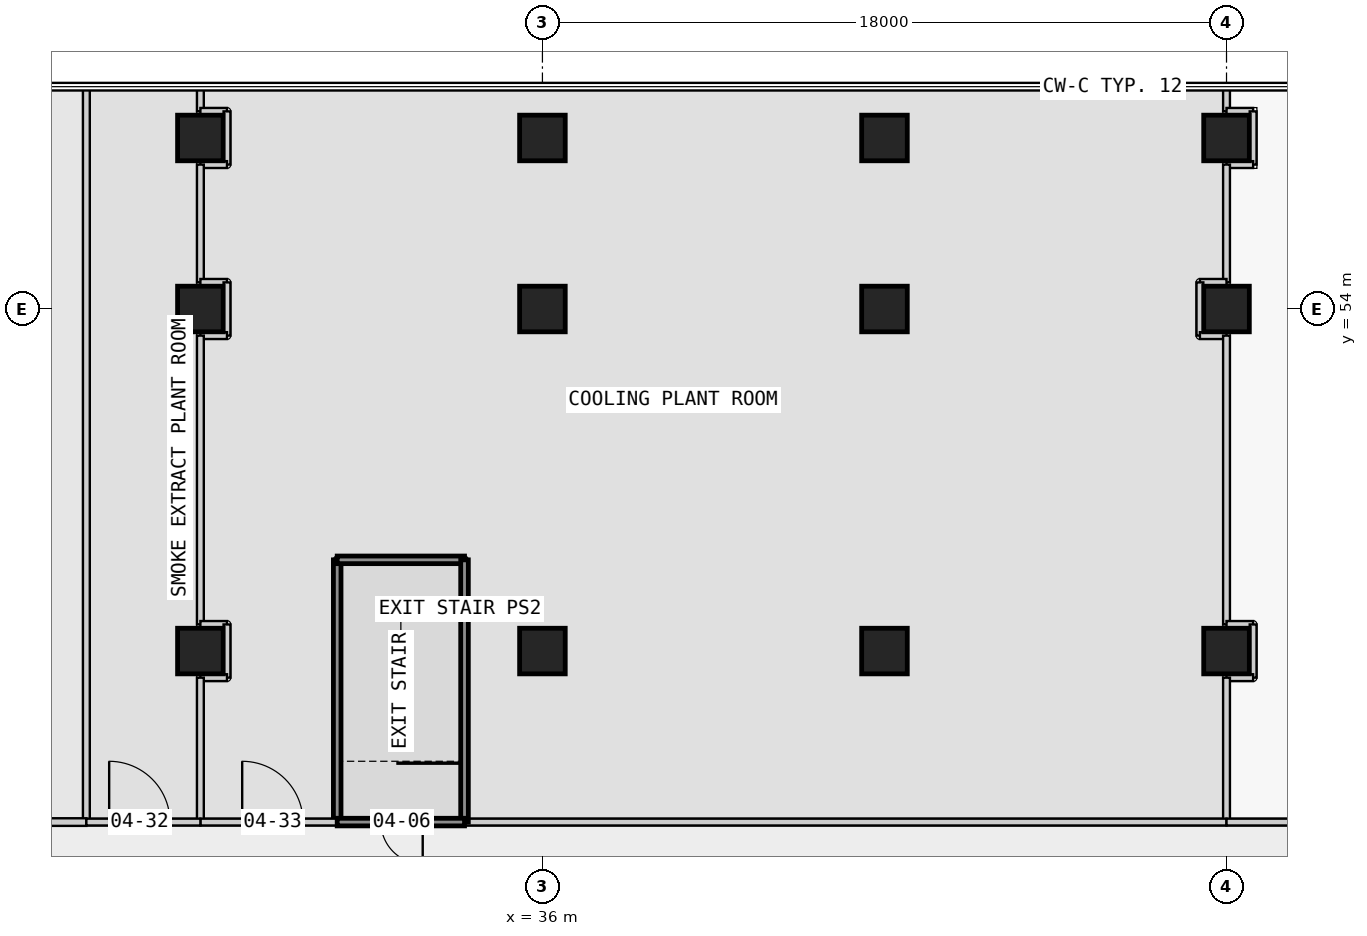
"""IFC4 building model, lengths in metres.
Left out: names, types, materials, properties, quantities, classifications, styles, units other than length and angle.
Written with IfcOpenShell. Run it as: python <this file> out.ifc"""

import sys

from ifc_helpers import new_model, si_unit, direction, frame, frame_2d, origin, origin_2d, place, context, subcontext, project, spatial, rectangle, extrude, element, fill, save


model = new_model("IFC4")
c1 = context("Model", 3, precision=1e-05, world=origin(), true_north=direction((0.0, 1.0)))
c2 = subcontext(c1, "Body", "Model", "MODEL_VIEW")
j1 = project(units=[si_unit("LENGTHUNIT", "METRE"), si_unit("PLANEANGLEUNIT", "RADIAN")], contexts=[c1])
p1 = place(None, origin())
s1 = spatial("IfcSite", under=j1, at=p1, CompositionType="ELEMENT")
p2 = place(p1, origin())
s2 = spatial("IfcBuilding", under=s1, at=p2, CompositionType="ELEMENT")
p3 = place(p2, frame((0.0, 0.0, 21.8)))
s3 = spatial("IfcBuildingStorey", under=s2, at=p3, CompositionType="ELEMENT", Elevation=21.8)
for number, where, z_axis, x_axis in (
    (1, (27.0, 45.0, 0.0), (0.0, 0.0, 1.0), (1.0, 0.0, 0.0)),
    (2, (27.0, 54.0, 0.0), (0.0, 0.0, 1.0), (1.0, 0.0, 0.0)),
    (3, (27.0, 58.5, 0.0), (0.0, 0.0, 1.0), (1.0, 0.0, 0.0)),
    (4, (36.0, 45.0, 0.0), (0.0, 0.0, 1.0), (1.0, 0.0, 0.0)),
    (5, (36.0, 54.0, 0.0), (0.0, 0.0, 1.0), (1.0, 0.0, 0.0)),
    (6, (36.0, 58.5, 0.0), (0.0, 0.0, 1.0), (1.0, 0.0, 0.0)),
    (7, (45.0, 45.0, 0.0), (0.0, 0.0, 1.0), (1.0, 0.0, 0.0)),
    (8, (45.0, 54.0, 0.0), (0.0, 0.0, 1.0), (1.0, 0.0, 0.0)),
    (9, (45.0, 58.5, 0.0), (0.0, 0.0, 1.0), (1.0, 0.0, 0.0)),
    (10, (54.0, 45.0, 0.0), (0.0, 0.0, 1.0), (1.0, 0.0, 0.0)),
    (11, (54.0, 54.0, 0.0), (0.0, 0.0, 1.0), (1.0, 0.0, 0.0)),
    (12, (54.0, 58.5, 0.0), (0.0, 0.0, 1.0), (1.0, 0.0, 0.0)),
):
    element("IfcColumn", number, at=place(p3, frame(where, z_axis=z_axis, x_axis=x_axis)), inside=s3, PredefinedType="COLUMN", context=c2, shape_type="SweptSolid", body=[
        extrude(rectangle(XDim=1.2, YDim=1.2, at=origin_2d()), origin(), (0.0, 0.0, 1.0), 5.0),
    ])
p4 = place(p3, frame((54.0, 59.85, 0.0), z_axis=(0.0, 0.0, 1.0), x_axis=(0.0, -1.0, 0.0)))
e13 = element("IfcWall", 13, at=p4, inside=s3, PredefinedType="PARTITIONING", context=c2, shape_type="SweptSolid", body=[
    extrude(rectangle(XDim=0.65, YDim=0.18, at=frame_2d((0.325, 0.0))), origin(), (0.0, 0.0, 1.0), 4.5),
])
p5 = place(p3, frame((54.0, 59.2, 0.0), z_axis=(0.0, 0.0, 1.0), x_axis=(1.0, 0.0, 0.0)))
e14 = element("IfcWall", 14, at=p5, inside=s3, PredefinedType="PARTITIONING", context=c2, shape_type="SweptSolid", body=[
    extrude(rectangle(XDim=0.7, YDim=0.18, at=frame_2d((0.35, 0.0))), origin(), (0.0, 0.0, 1.0), 4.5),
])
p6 = place(p3, frame((54.7, 59.2, 0.0), z_axis=(0.0, 0.0, 1.0), x_axis=(0.0, -1.0, 0.0)))
e15 = element("IfcWall", 15, at=p6, inside=s3, PredefinedType="PARTITIONING", context=c2, shape_type="SweptSolid", body=[
    extrude(rectangle(XDim=1.4, YDim=0.18, at=frame_2d((0.7, 0.0))), origin(), (0.0, 0.0, 1.0), 4.5),
])
p7 = place(p3, frame((54.7, 57.8, 0.0), z_axis=(0.0, 0.0, 1.0), x_axis=(-1.0, 0.0, 0.0)))
e16 = element("IfcWall", 16, at=p7, inside=s3, PredefinedType="PARTITIONING", context=c2, shape_type="SweptSolid", body=[
    extrude(rectangle(XDim=0.7, YDim=0.18, at=frame_2d((0.35, 0.0))), origin(), (0.0, 0.0, 1.0), 4.5),
])
p8 = place(p3, frame((54.0, 57.8, 0.0), z_axis=(0.0, 0.0, 1.0), x_axis=(0.0, -1.0, 0.0)))
e17 = element("IfcWall", 17, at=p8, inside=s3, PredefinedType="PARTITIONING", context=c2, shape_type="SweptSolid", body=[
    extrude(rectangle(XDim=3.1, YDim=0.18, at=frame_2d((1.55, 0.0))), origin(), (0.0, 0.0, 1.0), 4.5),
])
p9 = place(p3, frame((54.0, 54.7, 0.0), z_axis=(0.0, 0.0, 1.0), x_axis=(-1.0, 0.0, 0.0)))
e18 = element("IfcWall", 18, at=p9, inside=s3, PredefinedType="PARTITIONING", context=c2, shape_type="SweptSolid", body=[
    extrude(rectangle(XDim=0.7, YDim=0.18, at=frame_2d((0.35, 0.0))), origin(), (0.0, 0.0, 1.0), 4.5),
])
p10 = place(p3, frame((53.3, 54.7, 0.0), z_axis=(0.0, 0.0, 1.0), x_axis=(0.0, -1.0, 0.0)))
e19 = element("IfcWall", 19, at=p10, inside=s3, PredefinedType="PARTITIONING", context=c2, shape_type="SweptSolid", body=[
    extrude(rectangle(XDim=1.4, YDim=0.18, at=frame_2d((0.7, 0.0))), origin(), (0.0, 0.0, 1.0), 4.5),
])
p11 = place(p3, frame((53.3, 53.3, 0.0), z_axis=(0.0, 0.0, 1.0), x_axis=(1.0, 0.0, 0.0)))
e20 = element("IfcWall", 20, at=p11, inside=s3, PredefinedType="PARTITIONING", context=c2, shape_type="SweptSolid", body=[
    extrude(rectangle(XDim=0.7, YDim=0.18, at=frame_2d((0.35, 0.0))), origin(), (0.0, 0.0, 1.0), 4.5),
])
p12 = place(p3, frame((54.0, 53.3, 0.0), z_axis=(0.0, 0.0, 1.0), x_axis=(0.0, -1.0, 0.0)))
e21 = element("IfcWall", 21, at=p12, inside=s3, PredefinedType="PARTITIONING", context=c2, shape_type="SweptSolid", body=[
    extrude(rectangle(XDim=7.6, YDim=0.18, at=frame_2d((3.8, 0.0))), origin(), (0.0, 0.0, 1.0), 4.5),
])
p13 = place(p3, frame((54.0, 45.7, 0.0), z_axis=(0.0, 0.0, 1.0), x_axis=(1.0, 0.0, 0.0)))
e22 = element("IfcWall", 22, at=p13, inside=s3, PredefinedType="PARTITIONING", context=c2, shape_type="SweptSolid", body=[
    extrude(rectangle(XDim=0.7, YDim=0.18, at=frame_2d((0.35, 0.0))), origin(), (0.0, 0.0, 1.0), 4.5),
])
p14 = place(p3, frame((54.7, 45.7, 0.0), z_axis=(0.0, 0.0, 1.0), x_axis=(0.0, -1.0, 0.0)))
e23 = element("IfcWall", 23, at=p14, inside=s3, PredefinedType="PARTITIONING", context=c2, shape_type="SweptSolid", body=[
    extrude(rectangle(XDim=1.4, YDim=0.18, at=frame_2d((0.7, 0.0))), origin(), (0.0, 0.0, 1.0), 4.5),
])
p15 = place(p3, frame((54.7, 44.3, 0.0), z_axis=(0.0, 0.0, 1.0), x_axis=(-1.0, 0.0, 0.0)))
e24 = element("IfcWall", 24, at=p15, inside=s3, PredefinedType="PARTITIONING", context=c2, shape_type="SweptSolid", body=[
    extrude(rectangle(XDim=0.7, YDim=0.18, at=frame_2d((0.35, 0.0))), origin(), (0.0, 0.0, 1.0), 4.5),
])
p16 = place(p3, frame((54.0, 44.3, 0.0), z_axis=(0.0, 0.0, 1.0), x_axis=(0.0, -1.0, 0.0)))
e25 = element("IfcWall", 25, at=p16, inside=s3, PredefinedType="PARTITIONING", context=c2, shape_type="SweptSolid", body=[
    extrude(rectangle(XDim=3.8, YDim=0.18, at=frame_2d((1.9, 0.0))), origin(), (0.0, 0.0, 1.0), 4.5),
])
p17 = place(p3, frame((27.0, 59.85, 0.0), z_axis=(0.0, 0.0, 1.0), x_axis=(0.0, -1.0, 0.0)))
e26 = element("IfcWall", 26, at=p17, inside=s3, PredefinedType="PARTITIONING", context=c2, shape_type="SweptSolid", body=[
    extrude(rectangle(XDim=0.65, YDim=0.18, at=frame_2d((0.325, 0.0))), origin(), (0.0, 0.0, 1.0), 4.5),
])
p18 = place(p3, frame((27.0, 59.2, 0.0), z_axis=(0.0, 0.0, 1.0), x_axis=(1.0, 0.0, 0.0)))
e27 = element("IfcWall", 27, at=p18, inside=s3, PredefinedType="PARTITIONING", context=c2, shape_type="SweptSolid", body=[
    extrude(rectangle(XDim=0.7, YDim=0.18, at=frame_2d((0.35, 0.0))), origin(), (0.0, 0.0, 1.0), 4.5),
])
p19 = place(p3, frame((27.7, 59.2, 0.0), z_axis=(0.0, 0.0, 1.0), x_axis=(0.0, -1.0, 0.0)))
e28 = element("IfcWall", 28, at=p19, inside=s3, PredefinedType="PARTITIONING", context=c2, shape_type="SweptSolid", body=[
    extrude(rectangle(XDim=1.4, YDim=0.18, at=frame_2d((0.7, 0.0))), origin(), (0.0, 0.0, 1.0), 4.5),
])
p20 = place(p3, frame((27.7, 57.8, 0.0), z_axis=(0.0, 0.0, 1.0), x_axis=(-1.0, 0.0, 0.0)))
e29 = element("IfcWall", 29, at=p20, inside=s3, PredefinedType="PARTITIONING", context=c2, shape_type="SweptSolid", body=[
    extrude(rectangle(XDim=0.7, YDim=0.18, at=frame_2d((0.35, 0.0))), origin(), (0.0, 0.0, 1.0), 4.5),
])
p21 = place(p3, frame((27.0, 57.8, 0.0), z_axis=(0.0, 0.0, 1.0), x_axis=(0.0, -1.0, 0.0)))
e30 = element("IfcWall", 30, at=p21, inside=s3, PredefinedType="PARTITIONING", context=c2, shape_type="SweptSolid", body=[
    extrude(rectangle(XDim=3.1, YDim=0.18, at=frame_2d((1.55, 0.0))), origin(), (0.0, 0.0, 1.0), 4.5),
])
p22 = place(p3, frame((27.0, 54.7, 0.0), z_axis=(0.0, 0.0, 1.0), x_axis=(1.0, 0.0, 0.0)))
e31 = element("IfcWall", 31, at=p22, inside=s3, PredefinedType="PARTITIONING", context=c2, shape_type="SweptSolid", body=[
    extrude(rectangle(XDim=0.7, YDim=0.18, at=frame_2d((0.35, 0.0))), origin(), (0.0, 0.0, 1.0), 4.5),
])
p23 = place(p3, frame((27.7, 54.7, 0.0), z_axis=(0.0, 0.0, 1.0), x_axis=(0.0, -1.0, 0.0)))
e32 = element("IfcWall", 32, at=p23, inside=s3, PredefinedType="PARTITIONING", context=c2, shape_type="SweptSolid", body=[
    extrude(rectangle(XDim=1.4, YDim=0.18, at=frame_2d((0.7, 0.0))), origin(), (0.0, 0.0, 1.0), 4.5),
])
p24 = place(p3, frame((27.7, 53.3, 0.0), z_axis=(0.0, 0.0, 1.0), x_axis=(-1.0, 0.0, 0.0)))
e33 = element("IfcWall", 33, at=p24, inside=s3, PredefinedType="PARTITIONING", context=c2, shape_type="SweptSolid", body=[
    extrude(rectangle(XDim=0.7, YDim=0.18, at=frame_2d((0.35, 0.0))), origin(), (0.0, 0.0, 1.0), 4.5),
])
p25 = place(p3, frame((27.0, 53.3, 0.0), z_axis=(0.0, 0.0, 1.0), x_axis=(0.0, -1.0, 0.0)))
e34 = element("IfcWall", 34, at=p25, inside=s3, PredefinedType="PARTITIONING", context=c2, shape_type="SweptSolid", body=[
    extrude(rectangle(XDim=7.6, YDim=0.18, at=frame_2d((3.8, 0.0))), origin(), (0.0, 0.0, 1.0), 4.5),
])
p26 = place(p3, frame((27.0, 45.7, 0.0), z_axis=(0.0, 0.0, 1.0), x_axis=(1.0, 0.0, 0.0)))
e35 = element("IfcWall", 35, at=p26, inside=s3, PredefinedType="PARTITIONING", context=c2, shape_type="SweptSolid", body=[
    extrude(rectangle(XDim=0.7, YDim=0.18, at=frame_2d((0.35, 0.0))), origin(), (0.0, 0.0, 1.0), 4.5),
])
p27 = place(p3, frame((27.7, 45.7, 0.0), z_axis=(0.0, 0.0, 1.0), x_axis=(0.0, -1.0, 0.0)))
e36 = element("IfcWall", 36, at=p27, inside=s3, PredefinedType="PARTITIONING", context=c2, shape_type="SweptSolid", body=[
    extrude(rectangle(XDim=1.4, YDim=0.18, at=frame_2d((0.7, 0.0))), origin(), (0.0, 0.0, 1.0), 4.5),
])
p28 = place(p3, frame((27.7, 44.3, 0.0), z_axis=(0.0, 0.0, 1.0), x_axis=(-1.0, 0.0, 0.0)))
e37 = element("IfcWall", 37, at=p28, inside=s3, PredefinedType="PARTITIONING", context=c2, shape_type="SweptSolid", body=[
    extrude(rectangle(XDim=0.7, YDim=0.18, at=frame_2d((0.35, 0.0))), origin(), (0.0, 0.0, 1.0), 4.5),
])
p29 = place(p3, frame((27.0, 44.3, 0.0), z_axis=(0.0, 0.0, 1.0), x_axis=(0.0, -1.0, 0.0)))
e38 = element("IfcWall", 38, at=p29, inside=s3, PredefinedType="PARTITIONING", context=c2, shape_type="SweptSolid", body=[
    extrude(rectangle(XDim=3.8, YDim=0.18, at=frame_2d((1.9, 0.0))), origin(), (0.0, 0.0, 1.0), 4.5),
])
p30 = place(p3, frame((33.95, 40.5, 0.0), z_axis=(0.0, 0.0, 1.0), x_axis=(1.0, 0.0, 0.0)))
e39 = element("IfcWall", 39, at=p30, inside=s3, PredefinedType="PARTITIONING", context=c2, shape_type="SweptSolid", body=[
    extrude(rectangle(XDim=20.05, YDim=0.18, at=frame_2d((10.025, 0.0))), origin(), (0.0, 0.0, 1.0), 4.5),
])
p31 = place(p3, frame((24.0, 59.85, 0.0), z_axis=(0.0, 0.0, 1.0), x_axis=(0.0, -1.0, 0.0)))
e40 = element("IfcWall", 40, at=p31, inside=s3, PredefinedType="PARTITIONING", context=c2, shape_type="SweptSolid", body=[
    extrude(rectangle(XDim=19.35, YDim=0.18, at=frame_2d((9.675, 0.0))), origin(), (0.0, 0.0, 1.0), 4.5),
])
p32 = place(p3, frame((30.6, 40.5, 0.0), z_axis=(0.0, 0.0, 1.0), x_axis=(0.0, 1.0, 0.0)))
e41 = element("IfcWall", 41, at=p32, inside=s3, PredefinedType="PARTITIONING", context=c2, shape_type="SweptSolid", body=[
    extrude(rectangle(XDim=6.9, YDim=0.2, at=frame_2d((3.45, 0.0))), origin(), (0.0, 0.0, 1.0), 4.5),
])
p33 = place(p3, frame((30.6, 47.4, 0.0), z_axis=(0.0, 0.0, 1.0), x_axis=(1.0, 0.0, 0.0)))
e42 = element("IfcWall", 42, at=p33, inside=s3, PredefinedType="PARTITIONING", context=c2, shape_type="SweptSolid", body=[
    extrude(rectangle(XDim=3.35, YDim=0.2, at=frame_2d((1.675, 0.0))), origin(), (0.0, 0.0, 1.0), 4.5),
])
p34 = place(p3, frame((33.95, 47.4, 0.0), z_axis=(0.0, 0.0, 1.0), x_axis=(0.0, -1.0, 0.0)))
e43 = element("IfcWall", 43, at=p34, inside=s3, PredefinedType="PARTITIONING", context=c2, shape_type="SweptSolid", body=[
    extrude(rectangle(XDim=6.9, YDim=0.2, at=frame_2d((3.45, 0.0))), origin(), (0.0, 0.0, 1.0), 4.5),
])
p35 = place(p3, frame((54.0, 40.5, 0.0), z_axis=(0.0, 0.0, 1.0), x_axis=(1.0, 0.0, 0.0)))
e44 = element("IfcWall", 44, at=p35, inside=s3, PredefinedType="PARTITIONING", context=c2, shape_type="SweptSolid", body=[
    extrude(rectangle(XDim=12.6, YDim=0.18, at=frame_2d((6.3, 0.0))), origin(), (0.0, 0.0, 1.0), 4.5),
])
p36 = place(p35, frame((5.6, 0.0, 0.0)))
e45 = element("IfcOpeningElement", 45, at=p36, cuts=e44, PredefinedType="OPENING", context=c2, shape_type="SweptSolid", body=[
    extrude(rectangle(XDim=1.6, YDim=2.4, at=frame_2d((0.8, 1.2))), frame((0.0, 0.1, 0.0), z_axis=(0.0, -1.0, 0.0), x_axis=(1.0, 0.0, 0.0)), (0.0, 0.0, 1.0), 0.2),
])
p37 = place(p3, frame((18.6, 40.5, 0.0), z_axis=(0.0, 0.0, 1.0), x_axis=(1.0, 0.0, 0.0)))
e46 = element("IfcWall", 46, at=p37, inside=s3, PredefinedType="PARTITIONING", context=c2, shape_type="SweptSolid", body=[
    extrude(rectangle(XDim=5.4, YDim=0.2, at=frame_2d((2.7, 0.0))), origin(), (0.0, 0.0, 1.0), 4.5),
])
p38 = place(p3, frame((27.0, 40.5, 0.0), z_axis=(0.0, 0.0, 1.0), x_axis=(1.0, 0.0, 0.0)))
e47 = element("IfcWall", 47, at=p38, inside=s3, PredefinedType="PARTITIONING", context=c2, shape_type="SweptSolid", body=[
    extrude(rectangle(XDim=3.6, YDim=0.18, at=frame_2d((1.8, 0.0))), origin(), (0.0, 0.0, 1.0), 4.5),
])
p39 = place(p38, frame((1.1, 0.0, 0.0)))
e48 = element("IfcOpeningElement", 48, at=p39, cuts=e47, PredefinedType="OPENING", context=c2, shape_type="SweptSolid", body=[
    extrude(rectangle(XDim=1.6, YDim=2.4, at=frame_2d((0.8, 1.2))), frame((0.0, 0.1, 0.0), z_axis=(0.0, -1.0, 0.0), x_axis=(1.0, 0.0, 0.0)), (0.0, 0.0, 1.0), 0.2),
])
p40 = place(p3, frame((33.95, 40.5, 0.0), z_axis=(0.0, 0.0, 1.0), x_axis=(-1.0, 0.0, 0.0)))
e49 = element("IfcWall", 49, at=p40, inside=s3, PredefinedType="PARTITIONING", context=c2, shape_type="SweptSolid", body=[
    extrude(rectangle(XDim=3.35, YDim=0.2, at=frame_2d((1.675, 0.0))), origin(), (0.0, 0.0, 1.0), 4.5),
])
p41 = place(p40, frame((1.1, 0.0, 0.0)))
e50 = element("IfcOpeningElement", 50, at=p41, cuts=e49, PredefinedType="OPENING", context=c2, shape_type="SweptSolid", body=[
    extrude(rectangle(XDim=1.1, YDim=2.1, at=frame_2d((0.55, 1.05))), frame((0.0, 0.11, 0.0), z_axis=(0.0, -1.0, 0.0), x_axis=(1.0, 0.0, 0.0)), (0.0, 0.0, 1.0), 0.22),
])
p42 = place(p3, frame((24.0, 40.5, 0.0), z_axis=(0.0, 0.0, 1.0), x_axis=(1.0, 0.0, 0.0)))
e51 = element("IfcWall", 51, at=p42, inside=s3, PredefinedType="PARTITIONING", context=c2, shape_type="SweptSolid", body=[
    extrude(rectangle(XDim=3.0, YDim=0.18, at=frame_2d((1.5, 0.0))), origin(), (0.0, 0.0, 1.0), 4.5),
])
p43 = place(p42, frame((0.6, 0.0, 0.0)))
e52 = element("IfcOpeningElement", 52, at=p43, cuts=e51, PredefinedType="OPENING", context=c2, shape_type="SweptSolid", body=[
    extrude(rectangle(XDim=1.6, YDim=2.4, at=frame_2d((0.8, 1.2))), frame((0.0, 0.1, 0.0), z_axis=(0.0, -1.0, 0.0), x_axis=(1.0, 0.0, 0.0)), (0.0, 0.0, 1.0), 0.2),
])
p44 = place(p41, origin())
e53 = element("IfcDoor", 53, at=p44, inside=s3, OperationType="SINGLE_SWING_LEFT", PredefinedType="DOOR", context=c2, shape_type="SweptSolid", body=[
    extrude(rectangle(XDim=1.1, YDim=2.1, at=frame_2d((0.55, 1.05))), frame((0.0, 0.025, 0.0), z_axis=(0.0, -1.0, 0.0), x_axis=(1.0, 0.0, 0.0)), (0.0, 0.0, 1.0), 0.05),
])
fill(e50, e53)
p45 = place(p43, origin())
e54 = element("IfcDoor", 54, at=p45, inside=s3, OperationType="SINGLE_SWING_LEFT", PredefinedType="DOOR", context=c2, shape_type="SweptSolid", body=[
    extrude(rectangle(XDim=1.6, YDim=2.4, at=frame_2d((0.8, 1.2))), frame((0.0, 0.025, 0.0), z_axis=(0.0, -1.0, 0.0), x_axis=(1.0, 0.0, 0.0)), (0.0, 0.0, 1.0), 0.05),
])
fill(e52, e54)
p46 = place(p39, origin())
e55 = element("IfcDoor", 55, at=p46, inside=s3, OperationType="SINGLE_SWING_LEFT", PredefinedType="DOOR", context=c2, shape_type="SweptSolid", body=[
    extrude(rectangle(XDim=1.6, YDim=2.4, at=frame_2d((0.8, 1.2))), frame((0.0, 0.025, 0.0), z_axis=(0.0, -1.0, 0.0), x_axis=(1.0, 0.0, 0.0)), (0.0, 0.0, 1.0), 0.05),
])
fill(e48, e55)
save(model, sys.argv[1])
